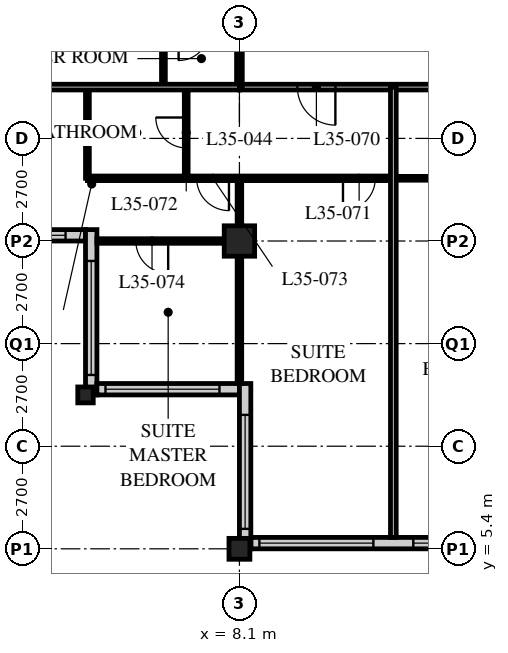
"""IFC4 building model, lengths in metres.
Left out: names, types, materials, properties, quantities, classifications, styles, units other than length and angle.
Written with IfcOpenShell. Run it as: python <this file> out.ifc"""

import sys

from ifc_helpers import new_model, si_unit, direction, frame, frame_2d, origin, origin_2d, place, context, subcontext, project, spatial, rectangle, hollow_rectangle, i_section, extrude, element, fill, save


model = new_model("IFC4")
c1 = context("Model", 3, precision=1e-05, world=origin(), true_north=direction((0.0, 1.0)))
c2 = subcontext(c1, "Body", "Model", "MODEL_VIEW")
j1 = project(units=[si_unit("LENGTHUNIT", "METRE"), si_unit("PLANEANGLEUNIT", "RADIAN")], contexts=[c1])
p1 = place(None, origin())
s1 = spatial("IfcSite", under=j1, at=p1, CompositionType="ELEMENT")
p2 = place(p1, origin())
s2 = spatial("IfcBuilding", under=s1, at=p2, CompositionType="ELEMENT")
p3 = place(p2, frame((0.0, 0.0, 137.4)))
s3 = spatial("IfcBuildingStorey", under=s2, at=p3, CompositionType="ELEMENT", Elevation=137.4)
p4 = place(p3, frame((4.05, 9.45, 0.0), z_axis=(0.0, 0.0, 1.0), x_axis=(1.0, 0.0, 0.0)))
e1 = element("IfcColumn", 1, at=p4, inside=s3, PredefinedType="COLUMN", context=c2, shape_type="SweptSolid", body=[
    extrude(i_section(OverallWidth=0.407, OverallDepth=0.419, WebThickness=0.031, FlangeThickness=0.049, FilletRadius=0.015, at=origin_2d()), origin(), (0.0, 0.0, 1.0), 3.4),
])
p5 = place(p3, frame((8.1, 5.4, 0.0), z_axis=(0.0, 0.0, 1.0), x_axis=(1.0, 0.0, 0.0)))
e2 = element("IfcColumn", 2, at=p5, inside=s3, PredefinedType="COLUMN", context=c2, shape_type="SweptSolid", body=[
    extrude(hollow_rectangle(XDim=0.55, YDim=0.55, WallThickness=0.04, at=origin_2d()), origin(), (0.0, 0.0, 1.0), 3.4),
])
p6 = place(p3, frame((8.1, 13.5, 0.0), z_axis=(0.0, 0.0, 1.0), x_axis=(1.0, 0.0, 0.0)))
e3 = element("IfcColumn", 3, at=p6, inside=s3, PredefinedType="COLUMN", context=c2, shape_type="SweptSolid", body=[
    extrude(hollow_rectangle(XDim=0.8, YDim=0.8, WallThickness=0.08, at=origin_2d()), origin(), (0.0, 0.0, 1.0), 3.4),
])
p7 = place(p3, frame((8.4, 5.55, 0.0), z_axis=(0.0, 0.0, 1.0), x_axis=(1.0, 0.0, 0.0)))
e4 = element("IfcWall", 4, at=p7, inside=s3, PredefinedType="SOLIDWALL", context=c2, shape_type="SweptSolid", body=[
    extrude(rectangle(XDim=40.2, YDim=0.3, at=frame_2d((20.1, 0.0))), origin(), (0.0, 0.0, 1.0), 3.19),
])
p8 = place(p7, frame((0.225, 0.0, 0.9)))
e5 = element("IfcOpeningElement", 5, at=p8, cuts=e4, PredefinedType="OPENING", context=c2, shape_type="SweptSolid", body=[
    extrude(rectangle(XDim=3.0, YDim=2.0, at=frame_2d((1.5, 1.0))), frame((0.0, 0.16, 0.0), z_axis=(0.0, -1.0, 0.0), x_axis=(1.0, 0.0, 0.0)), (0.0, 0.0, 1.0), 0.32),
])
p9 = place(p7, frame((4.275, 0.0, 0.9)))
e6 = element("IfcOpeningElement", 6, at=p9, cuts=e4, PredefinedType="OPENING", context=c2, shape_type="SweptSolid", body=[
    extrude(rectangle(XDim=3.0, YDim=2.0, at=frame_2d((1.5, 1.0))), frame((0.0, 0.16, 0.0), z_axis=(0.0, -1.0, 0.0), x_axis=(1.0, 0.0, 0.0)), (0.0, 0.0, 1.0), 0.32),
])
p10 = place(p7, frame((8.325, 0.0, 0.9)))
e7 = element("IfcOpeningElement", 7, at=p10, cuts=e4, PredefinedType="OPENING", context=c2, shape_type="SweptSolid", body=[
    extrude(rectangle(XDim=3.0, YDim=2.0, at=frame_2d((1.5, 1.0))), frame((0.0, 0.16, 0.0), z_axis=(0.0, -1.0, 0.0), x_axis=(1.0, 0.0, 0.0)), (0.0, 0.0, 1.0), 0.32),
])
p11 = place(p7, frame((12.375, 0.0, 0.9)))
e8 = element("IfcOpeningElement", 8, at=p11, cuts=e4, PredefinedType="OPENING", context=c2, shape_type="SweptSolid", body=[
    extrude(rectangle(XDim=3.0, YDim=2.0, at=frame_2d((1.5, 1.0))), frame((0.0, 0.16, 0.0), z_axis=(0.0, -1.0, 0.0), x_axis=(1.0, 0.0, 0.0)), (0.0, 0.0, 1.0), 0.32),
])
p12 = place(p7, frame((16.425, 0.0, 0.9)))
e9 = element("IfcOpeningElement", 9, at=p12, cuts=e4, PredefinedType="OPENING", context=c2, shape_type="SweptSolid", body=[
    extrude(rectangle(XDim=3.0, YDim=2.0, at=frame_2d((1.5, 1.0))), frame((0.0, 0.16, 0.0), z_axis=(0.0, -1.0, 0.0), x_axis=(1.0, 0.0, 0.0)), (0.0, 0.0, 1.0), 0.32),
])
p13 = place(p7, frame((20.475, 0.0, 0.9)))
e10 = element("IfcOpeningElement", 10, at=p13, cuts=e4, PredefinedType="OPENING", context=c2, shape_type="SweptSolid", body=[
    extrude(rectangle(XDim=3.0, YDim=2.0, at=frame_2d((1.5, 1.0))), frame((0.0, 0.16, 0.0), z_axis=(0.0, -1.0, 0.0), x_axis=(1.0, 0.0, 0.0)), (0.0, 0.0, 1.0), 0.32),
])
p14 = place(p7, frame((24.525, 0.0, 0.9)))
e11 = element("IfcOpeningElement", 11, at=p14, cuts=e4, PredefinedType="OPENING", context=c2, shape_type="SweptSolid", body=[
    extrude(rectangle(XDim=3.0, YDim=2.0, at=frame_2d((1.5, 1.0))), frame((0.0, 0.16, 0.0), z_axis=(0.0, -1.0, 0.0), x_axis=(1.0, 0.0, 0.0)), (0.0, 0.0, 1.0), 0.32),
])
p15 = place(p7, frame((28.575, 0.0, 0.9)))
e12 = element("IfcOpeningElement", 12, at=p15, cuts=e4, PredefinedType="OPENING", context=c2, shape_type="SweptSolid", body=[
    extrude(rectangle(XDim=3.0, YDim=2.0, at=frame_2d((1.5, 1.0))), frame((0.0, 0.16, 0.0), z_axis=(0.0, -1.0, 0.0), x_axis=(1.0, 0.0, 0.0)), (0.0, 0.0, 1.0), 0.32),
])
p16 = place(p7, frame((32.625, 0.0, 0.9)))
e13 = element("IfcOpeningElement", 13, at=p16, cuts=e4, PredefinedType="OPENING", context=c2, shape_type="SweptSolid", body=[
    extrude(rectangle(XDim=3.0, YDim=2.0, at=frame_2d((1.5, 1.0))), frame((0.0, 0.16, 0.0), z_axis=(0.0, -1.0, 0.0), x_axis=(1.0, 0.0, 0.0)), (0.0, 0.0, 1.0), 0.32),
])
p17 = place(p7, frame((36.675, 0.0, 0.9)))
e14 = element("IfcOpeningElement", 14, at=p17, cuts=e4, PredefinedType="OPENING", context=c2, shape_type="SweptSolid", body=[
    extrude(rectangle(XDim=3.0, YDim=2.0, at=frame_2d((1.5, 1.0))), frame((0.0, 0.16, 0.0), z_axis=(0.0, -1.0, 0.0), x_axis=(1.0, 0.0, 0.0)), (0.0, 0.0, 1.0), 0.32),
])
p18 = place(p3, frame((0.3, 13.65, 0.0), z_axis=(0.0, 0.0, 1.0), x_axis=(1.0, 0.0, 0.0)))
e15 = element("IfcWall", 15, at=p18, inside=s3, PredefinedType="SOLIDWALL", context=c2, shape_type="SweptSolid", body=[
    extrude(rectangle(XDim=3.75, YDim=0.3, at=frame_2d((1.875, 0.0))), origin(), (0.0, 0.0, 1.0), 3.19),
])
p19 = place(p18, frame((0.225, 0.0, 0.9)))
e16 = element("IfcOpeningElement", 16, at=p19, cuts=e15, PredefinedType="OPENING", context=c2, shape_type="SweptSolid", body=[
    extrude(rectangle(XDim=3.0, YDim=1.5, at=frame_2d((1.5, 0.75))), frame((0.0, 0.16, 0.0), z_axis=(0.0, -1.0, 0.0), x_axis=(1.0, 0.0, 0.0)), (0.0, 0.0, 1.0), 0.32),
])
p20 = place(p3, frame((4.2, 13.8, 0.0), z_axis=(0.0, 0.0, 1.0), x_axis=(0.0, -1.0, 0.0)))
e17 = element("IfcWall", 17, at=p20, inside=s3, PredefinedType="SOLIDWALL", context=c2, shape_type="SweptSolid", body=[
    extrude(rectangle(XDim=4.35, YDim=0.3, at=frame_2d((2.175, 0.0))), origin(), (0.0, 0.0, 1.0), 3.19),
])
p21 = place(p20, frame((0.825, 0.0, 0.9)))
e18 = element("IfcOpeningElement", 18, at=p21, cuts=e17, PredefinedType="OPENING", context=c2, shape_type="SweptSolid", body=[
    extrude(rectangle(XDim=3.0, YDim=1.5, at=frame_2d((1.5, 0.75))), frame((0.0, 0.16, 0.0), z_axis=(0.0, -1.0, 0.0), x_axis=(1.0, 0.0, 0.0)), (0.0, 0.0, 1.0), 0.32),
])
p22 = place(p3, frame((4.35, 9.6, 0.0), z_axis=(0.0, 0.0, 1.0), x_axis=(1.0, 0.0, 0.0)))
e19 = element("IfcWall", 19, at=p22, inside=s3, PredefinedType="SOLIDWALL", context=c2, shape_type="SweptSolid", body=[
    extrude(rectangle(XDim=3.75, YDim=0.3, at=frame_2d((1.875, 0.0))), origin(), (0.0, 0.0, 1.0), 3.19),
])
p23 = place(p22, frame((0.225, 0.0, 0.9)))
e20 = element("IfcOpeningElement", 20, at=p23, cuts=e19, PredefinedType="OPENING", context=c2, shape_type="SweptSolid", body=[
    extrude(rectangle(XDim=3.0, YDim=1.5, at=frame_2d((1.5, 0.75))), frame((0.0, 0.16, 0.0), z_axis=(0.0, -1.0, 0.0), x_axis=(1.0, 0.0, 0.0)), (0.0, 0.0, 1.0), 0.32),
])
p24 = place(p3, frame((8.25, 9.75, 0.0), z_axis=(0.0, 0.0, 1.0), x_axis=(0.0, -1.0, 0.0)))
e21 = element("IfcWall", 21, at=p24, inside=s3, PredefinedType="SOLIDWALL", context=c2, shape_type="SweptSolid", body=[
    extrude(rectangle(XDim=4.35, YDim=0.3, at=frame_2d((2.175, 0.0))), origin(), (0.0, 0.0, 1.0), 3.19),
])
p25 = place(p24, frame((0.825, 0.0, 0.9)))
e22 = element("IfcOpeningElement", 22, at=p25, cuts=e21, PredefinedType="OPENING", context=c2, shape_type="SweptSolid", body=[
    extrude(rectangle(XDim=3.0, YDim=1.5, at=frame_2d((1.5, 0.75))), frame((0.0, 0.16, 0.0), z_axis=(0.0, -1.0, 0.0), x_axis=(1.0, 0.0, 0.0)), (0.0, 0.0, 1.0), 0.32),
])
p26 = place(p3, frame((8.1, 17.55, 0.0), z_axis=(0.0, 0.0, 1.0), x_axis=(1.0, 0.0, 0.0)))
e23 = element("IfcWall", 23, at=p26, inside=s3, PredefinedType="PARTITIONING", context=c2, shape_type="SweptSolid", body=[
    extrude(rectangle(XDim=36.45, YDim=0.15, at=frame_2d((18.225, 0.0))), origin(), (0.0, 0.0, 1.0), 3.19),
])
p27 = place(p26, frame((9.625, 0.0, 0.0)))
e24 = element("IfcOpeningElement", 24, at=p27, cuts=e23, PredefinedType="OPENING", context=c2, shape_type="SweptSolid", body=[
    extrude(rectangle(XDim=1.0, YDim=2.1, at=frame_2d((0.5, 1.05))), frame((0.0, 0.085, 0.0), z_axis=(0.0, -1.0, 0.0), x_axis=(1.0, 0.0, 0.0)), (0.0, 0.0, 1.0), 0.17),
])
p28 = place(p26, frame((18.1, 0.0, 0.0)))
e25 = element("IfcOpeningElement", 25, at=p28, cuts=e23, PredefinedType="OPENING", context=c2, shape_type="SweptSolid", body=[
    extrude(rectangle(XDim=1.0, YDim=2.1, at=frame_2d((0.5, 1.05))), frame((0.0, 0.085, 0.0), z_axis=(0.0, -1.0, 0.0), x_axis=(1.0, 0.0, 0.0)), (0.0, 0.0, 1.0), 0.17),
])
p29 = place(p26, frame((26.75, 0.0, 0.0)))
e26 = element("IfcOpeningElement", 26, at=p29, cuts=e23, PredefinedType="OPENING", context=c2, shape_type="SweptSolid", body=[
    extrude(rectangle(XDim=1.0, YDim=2.1, at=frame_2d((0.5, 1.05))), frame((0.0, 0.085, 0.0), z_axis=(0.0, -1.0, 0.0), x_axis=(1.0, 0.0, 0.0)), (0.0, 0.0, 1.0), 0.17),
])
p30 = place(p26, frame((30.8, 0.0, 0.0)))
e27 = element("IfcOpeningElement", 27, at=p30, cuts=e23, PredefinedType="OPENING", context=c2, shape_type="SweptSolid", body=[
    extrude(rectangle(XDim=1.0, YDim=2.1, at=frame_2d((0.5, 1.05))), frame((0.0, 0.085, 0.0), z_axis=(0.0, -1.0, 0.0), x_axis=(1.0, 0.0, 0.0)), (0.0, 0.0, 1.0), 0.17),
])
p31 = place(p26, frame((1.525, 0.0, 0.0)))
e28 = element("IfcOpeningElement", 28, at=p31, cuts=e23, PredefinedType="OPENING", context=c2, shape_type="SweptSolid", body=[
    extrude(rectangle(XDim=1.0, YDim=2.1, at=frame_2d((0.5, 1.05))), frame((0.0, 0.085, 0.0), z_axis=(0.0, -1.0, 0.0), x_axis=(1.0, 0.0, 0.0)), (0.0, 0.0, 1.0), 0.17),
])
p32 = place(p26, frame((33.925, 0.0, 0.0)))
e29 = element("IfcOpeningElement", 29, at=p32, cuts=e23, PredefinedType="OPENING", context=c2, shape_type="SweptSolid", body=[
    extrude(rectangle(XDim=1.0, YDim=2.1, at=frame_2d((0.5, 1.05))), frame((0.0, 0.085, 0.0), z_axis=(0.0, -1.0, 0.0), x_axis=(1.0, 0.0, 0.0)), (0.0, 0.0, 1.0), 0.17),
])
p33 = place(p3, frame((8.1, 17.55, 0.0), z_axis=(0.0, 0.0, 1.0), x_axis=(0.0, 1.0, 0.0)))
e30 = element("IfcWall", 30, at=p33, inside=s3, PredefinedType="PARTITIONING", context=c2, shape_type="SweptSolid", body=[
    extrude(rectangle(XDim=28.35, YDim=0.15, at=frame_2d((14.175, 0.0))), origin(), (0.0, 0.0, 1.0), 2.578),
])
p34 = place(p33, frame((1.9, 0.0, 0.0)))
e31 = element("IfcOpeningElement", 31, at=p34, cuts=e30, PredefinedType="OPENING", context=c2, shape_type="SweptSolid", body=[
    extrude(rectangle(XDim=1.0, YDim=2.1, at=frame_2d((0.5, 1.05))), frame((0.0, 0.085, 0.0), z_axis=(0.0, -1.0, 0.0), x_axis=(1.0, 0.0, 0.0)), (0.0, 0.0, 1.0), 0.17),
])
p35 = place(p33, frame((10.0, 0.0, 0.0)))
e32 = element("IfcOpeningElement", 32, at=p35, cuts=e30, PredefinedType="OPENING", context=c2, shape_type="SweptSolid", body=[
    extrude(rectangle(XDim=1.0, YDim=2.1, at=frame_2d((0.5, 1.05))), frame((0.0, 0.085, 0.0), z_axis=(0.0, -1.0, 0.0), x_axis=(1.0, 0.0, 0.0)), (0.0, 0.0, 1.0), 0.17),
])
p36 = place(p33, frame((18.1, 0.0, 0.0)))
e33 = element("IfcOpeningElement", 33, at=p36, cuts=e30, PredefinedType="OPENING", context=c2, shape_type="SweptSolid", body=[
    extrude(rectangle(XDim=1.0, YDim=2.1, at=frame_2d((0.5, 1.05))), frame((0.0, 0.085, 0.0), z_axis=(0.0, -1.0, 0.0), x_axis=(1.0, 0.0, 0.0)), (0.0, 0.0, 1.0), 0.17),
])
p37 = place(p33, frame((24.9, 0.0, 0.0)))
e34 = element("IfcOpeningElement", 34, at=p37, cuts=e30, PredefinedType="OPENING", context=c2, shape_type="SweptSolid", body=[
    extrude(rectangle(XDim=1.0, YDim=2.1, at=frame_2d((0.5, 1.05))), frame((0.0, 0.085, 0.0), z_axis=(0.0, -1.0, 0.0), x_axis=(1.0, 0.0, 0.0)), (0.0, 0.0, 1.0), 0.17),
])
p38 = place(p3, frame((12.15, 15.15, 0.0), z_axis=(0.0, 0.0, 1.0), x_axis=(1.0, 0.0, 0.0)))
e35 = element("IfcWall", 35, at=p38, inside=s3, PredefinedType="PARTITIONING", context=c2, shape_type="SweptSolid", body=[
    extrude(rectangle(XDim=2.6, YDim=0.1, at=frame_2d((1.3, 0.0))), origin(), (0.0, 0.0, 1.0), 3.19),
])
p39 = place(p3, frame((6.1, 17.55, 0.0), z_axis=(0.0, 0.0, 1.0), x_axis=(0.0, 1.0, 0.0)))
e36 = element("IfcWall", 36, at=p39, inside=s3, PredefinedType="PARTITIONING", context=c2, shape_type="SweptSolid", body=[
    extrude(rectangle(XDim=1.5, YDim=0.1, at=frame_2d((0.75, 0.0))), origin(), (0.0, 0.0, 1.0), 3.19),
])
p40 = place(p3, frame((6.7, 17.55, 0.0), z_axis=(0.0, 0.0, 1.0), x_axis=(0.0, -1.0, 0.0)))
e37 = element("IfcWall", 37, at=p40, inside=s3, PredefinedType="PARTITIONING", context=c2, shape_type="SweptSolid", body=[
    extrude(rectangle(XDim=2.4, YDim=0.1, at=frame_2d((1.2, 0.0))), origin(), (0.0, 0.0, 1.0), 3.19),
])
p41 = place(p40, frame((0.8, 0.0, 0.0)))
e38 = element("IfcOpeningElement", 38, at=p41, cuts=e37, PredefinedType="OPENING", context=c2, shape_type="SweptSolid", body=[
    extrude(rectangle(XDim=0.8, YDim=2.1, at=frame_2d((0.4, 1.05))), frame((0.0, 0.06, 0.0), z_axis=(0.0, -1.0, 0.0), x_axis=(1.0, 0.0, 0.0)), (0.0, 0.0, 1.0), 0.12),
])
p42 = place(p3, frame((4.1, 17.55, 0.0), z_axis=(0.0, 0.0, 1.0), x_axis=(0.0, -1.0, 0.0)))
e39 = element("IfcWall", 39, at=p42, inside=s3, PredefinedType="PARTITIONING", context=c2, shape_type="SweptSolid", body=[
    extrude(rectangle(XDim=2.4, YDim=0.1, at=frame_2d((1.2, 0.0))), origin(), (0.0, 0.0, 1.0), 3.19),
])
p43 = place(p3, frame((4.1, 15.15, 0.0), z_axis=(0.0, 0.0, 1.0), x_axis=(1.0, 0.0, 0.0)))
e40 = element("IfcWall", 40, at=p43, inside=s3, PredefinedType="PARTITIONING", context=c2, shape_type="SweptSolid", body=[
    extrude(rectangle(XDim=8.05, YDim=0.12, at=frame_2d((4.025, 0.0))), origin(), (0.0, 0.0, 1.0), 3.19),
])
p44 = place(p43, frame((6.725, 0.0, 0.0)))
e41 = element("IfcOpeningElement", 41, at=p44, cuts=e40, PredefinedType="OPENING", context=c2, shape_type="SweptSolid", body=[
    extrude(rectangle(XDim=0.85, YDim=2.1, at=frame_2d((0.425, 1.05))), frame((0.0, 0.07, 0.0), z_axis=(0.0, -1.0, 0.0), x_axis=(1.0, 0.0, 0.0)), (0.0, 0.0, 1.0), 0.14),
])
p45 = place(p43, frame((2.875, 0.0, 0.0)))
e42 = element("IfcOpeningElement", 42, at=p45, cuts=e40, PredefinedType="OPENING", context=c2, shape_type="SweptSolid", body=[
    extrude(rectangle(XDim=0.85, YDim=2.1, at=frame_2d((0.425, 1.05))), frame((0.0, 0.07, 0.0), z_axis=(0.0, -1.0, 0.0), x_axis=(1.0, 0.0, 0.0)), (0.0, 0.0, 1.0), 0.14),
])
p46 = place(p3, frame((8.1, 15.15, 0.0), z_axis=(0.0, 0.0, 1.0), x_axis=(0.0, -1.0, 0.0)))
e43 = element("IfcWall", 43, at=p46, inside=s3, PredefinedType="PARTITIONING", context=c2, shape_type="SweptSolid", body=[
    extrude(rectangle(XDim=5.4, YDim=0.12, at=frame_2d((2.7, 0.0))), origin(), (0.0, 0.0, 1.0), 2.578),
])
p47 = place(p3, frame((8.1, 13.5, 0.0), z_axis=(0.0, 0.0, 1.0), x_axis=(-1.0, 0.0, 0.0)))
e44 = element("IfcWall", 44, at=p47, inside=s3, PredefinedType="PARTITIONING", context=c2, shape_type="SweptSolid", body=[
    extrude(rectangle(XDim=3.75, YDim=0.12, at=frame_2d((1.875, 0.0))), origin(), (0.0, 0.0, 1.0), 2.578),
])
p48 = place(p47, frame((1.875, 0.0, 0.0)))
e45 = element("IfcOpeningElement", 45, at=p48, cuts=e44, PredefinedType="OPENING", context=c2, shape_type="SweptSolid", body=[
    extrude(rectangle(XDim=0.85, YDim=2.1, at=frame_2d((0.425, 1.05))), frame((0.0, 0.07, 0.0), z_axis=(0.0, -1.0, 0.0), x_axis=(1.0, 0.0, 0.0)), (0.0, 0.0, 1.0), 0.14),
])
p49 = place(p3, frame((0.3, 17.55, 0.0), z_axis=(0.0, 0.0, 1.0), x_axis=(1.0, 0.0, 0.0)))
e46 = element("IfcWall", 46, at=p49, inside=s3, PredefinedType="PARTITIONING", context=c2, shape_type="SweptSolid", body=[
    extrude(rectangle(XDim=7.8, YDim=0.15, at=frame_2d((3.9, 0.0))), origin(), (0.0, 0.0, 1.0), 3.19),
])
p50 = place(p3, frame((12.15, 17.55, 0.0), z_axis=(0.0, 0.0, 1.0), x_axis=(0.0, -1.0, 0.0)))
e47 = element("IfcWall", 47, at=p50, inside=s3, PredefinedType="PARTITIONING", context=c2, shape_type="SweptSolid", body=[
    extrude(rectangle(XDim=11.85, YDim=0.15, at=frame_2d((5.925, 0.0))), origin(), (0.0, 0.0, 1.0), 3.19),
])
p51 = place(p8, origin())
e48 = element("IfcWindow", 48, at=p51, inside=s3, PartitioningType="SINGLE_PANEL", PredefinedType="WINDOW", context=c2, shape_type="SweptSolid", body=[
    extrude(rectangle(XDim=3.0, YDim=2.0, at=frame_2d((1.5, 1.0))), frame((0.0, 0.03, 0.0), z_axis=(0.0, -1.0, 0.0), x_axis=(1.0, 0.0, 0.0)), (0.0, 0.0, 1.0), 0.06),
])
fill(e5, e48)
p52 = place(p9, origin())
e49 = element("IfcWindow", 49, at=p52, inside=s3, PartitioningType="SINGLE_PANEL", PredefinedType="WINDOW", context=c2, shape_type="SweptSolid", body=[
    extrude(rectangle(XDim=3.0, YDim=2.0, at=frame_2d((1.5, 1.0))), frame((0.0, 0.03, 0.0), z_axis=(0.0, -1.0, 0.0), x_axis=(1.0, 0.0, 0.0)), (0.0, 0.0, 1.0), 0.06),
])
fill(e6, e49)
p53 = place(p19, origin())
e50 = element("IfcWindow", 50, at=p53, inside=s3, PartitioningType="SINGLE_PANEL", PredefinedType="WINDOW", context=c2, shape_type="SweptSolid", body=[
    extrude(rectangle(XDim=3.0, YDim=1.5, at=frame_2d((1.5, 0.75))), frame((0.0, 0.03, 0.0), z_axis=(0.0, -1.0, 0.0), x_axis=(1.0, 0.0, 0.0)), (0.0, 0.0, 1.0), 0.06),
])
fill(e16, e50)
p54 = place(p21, origin())
e51 = element("IfcWindow", 51, at=p54, inside=s3, PartitioningType="SINGLE_PANEL", PredefinedType="WINDOW", context=c2, shape_type="SweptSolid", body=[
    extrude(rectangle(XDim=3.0, YDim=1.5, at=frame_2d((1.5, 0.75))), frame((0.0, 0.03, 0.0), z_axis=(0.0, -1.0, 0.0), x_axis=(1.0, 0.0, 0.0)), (0.0, 0.0, 1.0), 0.06),
])
fill(e18, e51)
p55 = place(p23, origin())
e52 = element("IfcWindow", 52, at=p55, inside=s3, PartitioningType="SINGLE_PANEL", PredefinedType="WINDOW", context=c2, shape_type="SweptSolid", body=[
    extrude(rectangle(XDim=3.0, YDim=1.5, at=frame_2d((1.5, 0.75))), frame((0.0, 0.03, 0.0), z_axis=(0.0, -1.0, 0.0), x_axis=(1.0, 0.0, 0.0)), (0.0, 0.0, 1.0), 0.06),
])
fill(e20, e52)
p56 = place(p25, origin())
e53 = element("IfcWindow", 53, at=p56, inside=s3, PartitioningType="SINGLE_PANEL", PredefinedType="WINDOW", context=c2, shape_type="SweptSolid", body=[
    extrude(rectangle(XDim=3.0, YDim=1.5, at=frame_2d((1.5, 0.75))), frame((0.0, 0.03, 0.0), z_axis=(0.0, -1.0, 0.0), x_axis=(1.0, 0.0, 0.0)), (0.0, 0.0, 1.0), 0.06),
])
fill(e22, e53)
p57 = place(p31, origin())
e54 = element("IfcDoor", 54, at=p57, inside=s3, OperationType="SINGLE_SWING_LEFT", PredefinedType="DOOR", context=c2, shape_type="SweptSolid", body=[
    extrude(rectangle(XDim=1.0, YDim=2.1, at=frame_2d((0.5, 1.05))), frame((0.0, 0.025, 0.0), z_axis=(0.0, -1.0, 0.0), x_axis=(1.0, 0.0, 0.0)), (0.0, 0.0, 1.0), 0.05),
])
fill(e28, e54)
p58 = place(p44, origin())
e55 = element("IfcDoor", 55, at=p58, inside=s3, OperationType="SINGLE_SWING_RIGHT", PredefinedType="DOOR", context=c2, shape_type="SweptSolid", body=[
    extrude(rectangle(XDim=0.85, YDim=2.1, at=frame_2d((0.425, 1.05))), frame((0.0, 0.025, 0.0), z_axis=(0.0, -1.0, 0.0), x_axis=(1.0, 0.0, 0.0)), (0.0, 0.0, 1.0), 0.05),
])
fill(e41, e55)
p59 = place(p41, origin())
e56 = element("IfcDoor", 56, at=p59, inside=s3, OperationType="SINGLE_SWING_RIGHT", PredefinedType="DOOR", context=c2, shape_type="SweptSolid", body=[
    extrude(rectangle(XDim=0.8, YDim=2.1, at=frame_2d((0.4, 1.05))), frame((0.0, 0.025, 0.0), z_axis=(0.0, -1.0, 0.0), x_axis=(1.0, 0.0, 0.0)), (0.0, 0.0, 1.0), 0.05),
])
fill(e38, e56)
p60 = place(p45, origin())
e57 = element("IfcDoor", 57, at=p60, inside=s3, OperationType="SINGLE_SWING_LEFT", PredefinedType="DOOR", context=c2, shape_type="SweptSolid", body=[
    extrude(rectangle(XDim=0.85, YDim=2.1, at=frame_2d((0.425, 1.05))), frame((0.0, 0.025, 0.0), z_axis=(0.0, -1.0, 0.0), x_axis=(1.0, 0.0, 0.0)), (0.0, 0.0, 1.0), 0.05),
])
fill(e42, e57)
p61 = place(p48, origin())
e58 = element("IfcDoor", 58, at=p61, inside=s3, OperationType="SINGLE_SWING_LEFT", PredefinedType="DOOR", context=c2, shape_type="SweptSolid", body=[
    extrude(rectangle(XDim=0.85, YDim=2.1, at=frame_2d((0.425, 1.05))), frame((0.0, 0.025, 0.0), z_axis=(0.0, -1.0, 0.0), x_axis=(1.0, 0.0, 0.0)), (0.0, 0.0, 1.0), 0.05),
])
fill(e45, e58)
save(model, sys.argv[1])
